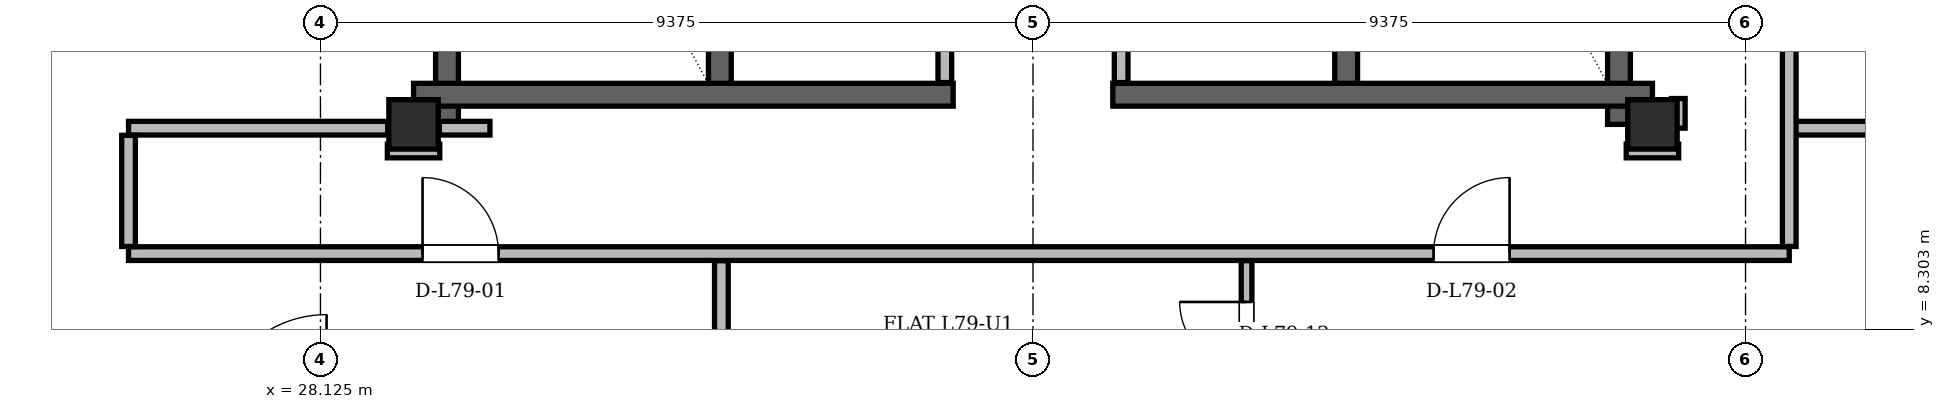
"""IFC4 building model, lengths in metres.
Left out: names, types, materials, properties, quantities, classifications, styles, units other than length and angle.
Written with IfcOpenShell. Run it as: python <this file> out.ifc"""

import sys

from ifc_helpers import new_model, si_unit, direction, frame, frame_2d, origin, origin_2d, place, context, subcontext, project, spatial, rectangle, hollow_rectangle, extrude, element, fill, save


model = new_model("IFC4")
c1 = context("Model", 3, precision=1e-05, world=origin(), true_north=direction((0.0, 1.0)))
c2 = subcontext(c1, "Body", "Model", "MODEL_VIEW")
j1 = project(units=[si_unit("LENGTHUNIT", "METRE"), si_unit("PLANEANGLEUNIT", "RADIAN")], contexts=[c1])
p1 = place(None, origin())
s1 = spatial("IfcSite", under=j1, at=p1, CompositionType="ELEMENT")
p2 = place(p1, origin())
s2 = spatial("IfcBuilding", under=s1, at=p2, CompositionType="ELEMENT")
p3 = place(p2, frame((0.0, 0.0, 301.2)))
s3 = spatial("IfcBuildingStorey", under=s2, at=p3, CompositionType="ELEMENT", Elevation=301.2)
for number, where, z_axis, x_axis in (
    (1, (29.35, 11.0, 0.0), (0.0, 0.0, 1.0), (1.0, 0.0, 0.0)),
    (2, (45.65, 11.0, 0.0), (0.0, 0.0, 1.0), (1.0, 0.0, 0.0)),
):
    element("IfcColumn", number, at=place(p3, frame(where, z_axis=z_axis, x_axis=x_axis)), inside=s3, PredefinedType="COLUMN", context=c2, shape_type="SweptSolid", body=[
        extrude(hollow_rectangle(XDim=0.65, YDim=0.65, WallThickness=0.05, at=origin_2d()), origin(), (0.0, 0.0, 1.0), 3.9),
    ])
for number, where, z_axis, x_axis in (
    (3, (29.79, 11.0, 0.0), (0.0, 0.0, 1.0), (0.0, 1.0, 0.0)),
    (4, (45.21, 11.0, 0.0), (0.0, 0.0, 1.0), (0.0, 1.0, 0.0)),
):
    element("IfcWall", number, at=place(p3, frame(where, z_axis=z_axis, x_axis=x_axis)), inside=s3, PredefinedType="SHEAR", context=c2, shape_type="SweptSolid", body=[
        extrude(rectangle(XDim=13.3, YDim=0.3, at=frame_2d((6.65, 0.0))), origin(), (0.0, 0.0, 1.0), 3.68),
    ])
for number, where, z_axis, x_axis in (
    (5, (29.35, 11.39, 0.0), (0.0, 0.0, 1.0), (1.0, 0.0, 0.0)),
    (6, (38.55, 11.39, 0.0), (0.0, 0.0, 1.0), (1.0, 0.0, 0.0)),
):
    element("IfcWall", number, at=place(p3, frame(where, z_axis=z_axis, x_axis=x_axis)), inside=s3, PredefinedType="SHEAR", context=c2, shape_type="SweptSolid", body=[
        extrude(rectangle(XDim=7.1, YDim=0.3, at=frame_2d((3.55, 0.0))), origin(), (0.0, 0.0, 1.0), 3.68),
    ])
for number, where, z_axis, x_axis in (
    (7, (33.38, 11.54, 0.0), (0.0, 0.0, 1.0), (0.0, 1.0, 0.0)),
    (8, (41.62, 11.54, 0.0), (0.0, 0.0, 1.0), (0.0, 1.0, 0.0)),
):
    element("IfcWall", number, at=place(p3, frame(where, z_axis=z_axis, x_axis=x_axis)), inside=s3, PredefinedType="SHEAR", context=c2, shape_type="SweptSolid", body=[
        extrude(rectangle(XDim=7.62, YDim=0.3, at=frame_2d((3.81, 0.0))), origin(), (0.0, 0.0, 1.0), 3.68),
    ])
p4 = place(p3, frame((58.261, 10.345, 0.0), z_axis=(0.0, 0.0, 1.0), x_axis=(-0.499999872078, 0.86602547764, 0.0)))
e9 = element("IfcWall", 9, at=p4, inside=s3, PredefinedType="SOLIDWALL", context=c2, shape_type="SweptSolid", body=[
    extrude(rectangle(XDim=37.658, YDim=0.29, at=frame_2d((18.829, 0.0))), origin(), (0.0, 0.0, 1.0), 3.058),
])
p5 = place(p4, frame((8.034, 0.0, 0.0)))
e10 = element("IfcOpeningElement", 10, at=p5, cuts=e9, PredefinedType="OPENING", context=c2, shape_type="SweptSolid", body=[
    extrude(rectangle(XDim=1.5, YDim=2.2, at=frame_2d((0.75, 1.1))), frame((0.0, 0.145, 0.0), z_axis=(0.0, -1.0, 0.0), x_axis=(1.0, 0.0, 0.0)), (0.0, 0.0, 1.0), 0.29),
])
p6 = place(p4, frame((32.618, 0.0, 0.0)))
e11 = element("IfcOpeningElement", 11, at=p6, cuts=e9, PredefinedType="OPENING", context=c2, shape_type="SweptSolid", body=[
    extrude(rectangle(XDim=1.3, YDim=2.2, at=frame_2d((0.65, 1.1))), frame((0.0, 0.145, 0.0), z_axis=(0.0, -1.0, 0.0), x_axis=(1.0, 0.0, 0.0)), (0.0, 0.0, 1.0), 0.29),
])
p7 = place(p4, frame((1.003, 0.0, 0.85)))
e12 = element("IfcOpeningElement", 12, at=p7, cuts=e9, PredefinedType="OPENING", context=c2, shape_type="SweptSolid", body=[
    extrude(rectangle(XDim=1.2, YDim=1.48, at=frame_2d((0.6, 0.74))), frame((0.0, 0.145, 0.0), z_axis=(0.0, -1.0, 0.0), x_axis=(1.0, 0.0, 0.0)), (0.0, 0.0, 1.0), 0.29),
])
p8 = place(p4, frame((13.352, 0.0, 0.85)))
e13 = element("IfcOpeningElement", 13, at=p8, cuts=e9, PredefinedType="OPENING", context=c2, shape_type="SweptSolid", body=[
    extrude(rectangle(XDim=1.6, YDim=1.7, at=frame_2d((0.8, 0.85))), frame((0.0, 0.145, 0.0), z_axis=(0.0, -1.0, 0.0), x_axis=(1.0, 0.0, 0.0)), (0.0, 0.0, 1.0), 0.29),
])
p9 = place(p4, frame((35.063, 0.0, 0.85)))
e14 = element("IfcOpeningElement", 14, at=p9, cuts=e9, PredefinedType="OPENING", context=c2, shape_type="SweptSolid", body=[
    extrude(rectangle(XDim=1.2, YDim=1.48, at=frame_2d((0.6, 0.74))), frame((0.0, 0.145, 0.0), z_axis=(0.0, -1.0, 0.0), x_axis=(1.0, 0.0, 0.0)), (0.0, 0.0, 1.0), 0.29),
])
p10 = place(p4, frame((18.559, 0.0, 0.85)))
e15 = element("IfcOpeningElement", 15, at=p10, cuts=e9, PredefinedType="OPENING", context=c2, shape_type="SweptSolid", body=[
    extrude(rectangle(XDim=3.0, YDim=2.098, at=frame_2d((1.5, 1.049))), frame((0.0, 0.145, 0.0), z_axis=(0.0, -1.0, 0.0), x_axis=(1.0, 0.0, 0.0)), (0.0, 0.0, 1.0), 0.29),
])
p11 = place(p4, frame((24.514, 0.0, 0.85)))
e16 = element("IfcOpeningElement", 16, at=p11, cuts=e9, PredefinedType="OPENING", context=c2, shape_type="SweptSolid", body=[
    extrude(rectangle(XDim=1.2, YDim=1.48, at=frame_2d((0.6, 0.74))), frame((0.0, 0.145, 0.0), z_axis=(0.0, -1.0, 0.0), x_axis=(1.0, 0.0, 0.0)), (0.0, 0.0, 1.0), 0.29),
])
p12 = place(p4, frame((29.78, 0.0, 0.85)))
e17 = element("IfcOpeningElement", 17, at=p12, cuts=e9, PredefinedType="OPENING", context=c2, shape_type="SweptSolid", body=[
    extrude(rectangle(XDim=1.2, YDim=1.48, at=frame_2d((0.6, 0.74))), frame((0.0, 0.145, 0.0), z_axis=(0.0, -1.0, 0.0), x_axis=(1.0, 0.0, 0.0)), (0.0, 0.0, 1.0), 0.29),
])
p13 = place(p3, frame((35.568, 42.958, 0.0), z_axis=(0.0, 0.0, 1.0), x_axis=(-0.499999872078, -0.86602547764, 0.0)))
e18 = element("IfcWall", 18, at=p13, inside=s3, PredefinedType="SOLIDWALL", context=c2, shape_type="SweptSolid", body=[
    extrude(rectangle(XDim=37.658, YDim=0.29, at=frame_2d((18.829, 0.0))), origin(), (0.0, 0.0, 1.0), 3.058),
])
p14 = place(p13, frame((8.034, 0.0, 0.0)))
e19 = element("IfcOpeningElement", 19, at=p14, cuts=e18, PredefinedType="OPENING", context=c2, shape_type="SweptSolid", body=[
    extrude(rectangle(XDim=1.5, YDim=2.2, at=frame_2d((0.75, 1.1))), frame((0.0, 0.145, 0.0), z_axis=(0.0, -1.0, 0.0), x_axis=(1.0, 0.0, 0.0)), (0.0, 0.0, 1.0), 0.29),
])
p15 = place(p13, frame((32.518, 0.0, 0.0)))
e20 = element("IfcOpeningElement", 20, at=p15, cuts=e18, PredefinedType="OPENING", context=c2, shape_type="SweptSolid", body=[
    extrude(rectangle(XDim=1.5, YDim=2.2, at=frame_2d((0.75, 1.1))), frame((0.0, 0.145, 0.0), z_axis=(0.0, -1.0, 0.0), x_axis=(1.0, 0.0, 0.0)), (0.0, 0.0, 1.0), 0.29),
])
p16 = place(p13, frame((27.303, 0.0, 0.85)))
e21 = element("IfcOpeningElement", 21, at=p16, cuts=e18, PredefinedType="OPENING", context=c2, shape_type="SweptSolid", body=[
    extrude(rectangle(XDim=2.2, YDim=1.85, at=frame_2d((1.1, 0.925))), frame((0.0, 0.145, 0.0), z_axis=(0.0, -1.0, 0.0), x_axis=(1.0, 0.0, 0.0)), (0.0, 0.0, 1.0), 0.29),
])
p17 = place(p13, frame((34.437, 0.0, 0.85)))
e22 = element("IfcOpeningElement", 22, at=p17, cuts=e18, PredefinedType="OPENING", context=c2, shape_type="SweptSolid", body=[
    extrude(rectangle(XDim=1.6, YDim=1.7, at=frame_2d((0.8, 0.85))), frame((0.0, 0.145, 0.0), z_axis=(0.0, -1.0, 0.0), x_axis=(1.0, 0.0, 0.0)), (0.0, 0.0, 1.0), 0.29),
])
p18 = place(p13, frame((21.655, 0.0, 0.85)))
e23 = element("IfcOpeningElement", 23, at=p18, cuts=e18, PredefinedType="OPENING", context=c2, shape_type="SweptSolid", body=[
    extrude(rectangle(XDim=1.2, YDim=1.48, at=frame_2d((0.6, 0.74))), frame((0.0, 0.145, 0.0), z_axis=(0.0, -1.0, 0.0), x_axis=(1.0, 0.0, 0.0)), (0.0, 0.0, 1.0), 0.29),
])
p19 = place(p13, frame((23.901, 0.0, 0.85)))
e24 = element("IfcOpeningElement", 24, at=p19, cuts=e18, PredefinedType="OPENING", context=c2, shape_type="SweptSolid", body=[
    extrude(rectangle(XDim=1.4, YDim=1.6, at=frame_2d((0.7, 0.8))), frame((0.0, 0.145, 0.0), z_axis=(0.0, -1.0, 0.0), x_axis=(1.0, 0.0, 0.0)), (0.0, 0.0, 1.0), 0.29),
])
p20 = place(p13, frame((15.246, 0.0, 0.85)))
e25 = element("IfcOpeningElement", 25, at=p20, cuts=e18, PredefinedType="OPENING", context=c2, shape_type="SweptSolid", body=[
    extrude(rectangle(XDim=2.6, YDim=1.95, at=frame_2d((1.3, 0.975))), frame((0.0, 0.145, 0.0), z_axis=(0.0, -1.0, 0.0), x_axis=(1.0, 0.0, 0.0)), (0.0, 0.0, 1.0), 0.29),
])
p21 = place(p13, frame((1.164, 0.0, 0.85)))
e26 = element("IfcOpeningElement", 26, at=p21, cuts=e18, PredefinedType="OPENING", context=c2, shape_type="SweptSolid", body=[
    extrude(rectangle(XDim=1.2, YDim=1.48, at=frame_2d((0.6, 0.74))), frame((0.0, 0.145, 0.0), z_axis=(0.0, -1.0, 0.0), x_axis=(1.0, 0.0, 0.0)), (0.0, 0.0, 1.0), 0.29),
])
p22 = place(p3, frame((36.34, 11.55, 0.0), z_axis=(0.0, 0.0, 1.0), x_axis=(0.0, 1.0, 0.0)))
e27 = element("IfcWall", 27, at=p22, inside=s3, PredefinedType="PARTITIONING", context=c2, shape_type="SweptSolid", body=[
    extrude(rectangle(XDim=5.55, YDim=0.18, at=frame_2d((2.775, 0.0))), origin(), (0.0, 0.0, 1.0), 3.68),
])
p23 = place(p22, frame((0.55, 0.0, 0.0)))
e28 = element("IfcOpeningElement", 28, at=p23, cuts=e27, PredefinedType="OPENING", context=c2, shape_type="SweptSolid", body=[
    extrude(rectangle(XDim=0.88, YDim=2.08, at=frame_2d((0.44, 1.04))), frame((0.0, 0.09, 0.0), z_axis=(0.0, -1.0, 0.0), x_axis=(1.0, 0.0, 0.0)), (0.0, 0.0, 1.0), 0.18),
])
p24 = place(p22, frame((3.25, 0.0, 0.0)))
e29 = element("IfcOpeningElement", 29, at=p24, cuts=e27, PredefinedType="OPENING", context=c2, shape_type="SweptSolid", body=[
    extrude(rectangle(XDim=0.88, YDim=2.08, at=frame_2d((0.44, 1.04))), frame((0.0, 0.09, 0.0), z_axis=(0.0, -1.0, 0.0), x_axis=(1.0, 0.0, 0.0)), (0.0, 0.0, 1.0), 0.18),
])
p25 = place(p3, frame((38.66, 11.55, 0.0), z_axis=(0.0, 0.0, 1.0), x_axis=(0.0, 1.0, 0.0)))
e30 = element("IfcWall", 30, at=p25, inside=s3, PredefinedType="PARTITIONING", context=c2, shape_type="SweptSolid", body=[
    extrude(rectangle(XDim=5.55, YDim=0.18, at=frame_2d((2.775, 0.0))), origin(), (0.0, 0.0, 1.0), 3.68),
])
p26 = place(p25, frame((1.35, 0.0, 0.0)))
e31 = element("IfcOpeningElement", 31, at=p26, cuts=e30, PredefinedType="OPENING", context=c2, shape_type="SweptSolid", body=[
    extrude(rectangle(XDim=0.88, YDim=2.08, at=frame_2d((0.44, 1.04))), frame((0.0, 0.09, 0.0), z_axis=(0.0, -1.0, 0.0), x_axis=(1.0, 0.0, 0.0)), (0.0, 0.0, 1.0), 0.18),
])
p27 = place(p25, frame((4.1, 0.0, 0.0)))
e32 = element("IfcOpeningElement", 32, at=p27, cuts=e30, PredefinedType="OPENING", context=c2, shape_type="SweptSolid", body=[
    extrude(rectangle(XDim=0.88, YDim=2.08, at=frame_2d((0.44, 1.04))), frame((0.0, 0.09, 0.0), z_axis=(0.0, -1.0, 0.0), x_axis=(1.0, 0.0, 0.0)), (0.0, 0.0, 1.0), 0.18),
])
p28 = place(p3, frame((25.6, 9.3, 0.0), z_axis=(0.0, 0.0, 1.0), x_axis=(1.0, 0.0, 0.0)))
e33 = element("IfcWall", 33, at=p28, inside=s3, PredefinedType="PARTITIONING", context=c2, shape_type="SweptSolid", body=[
    extrude(rectangle(XDim=21.85, YDim=0.18, at=frame_2d((10.925, 0.0))), origin(), (0.0, 0.0, 1.0), 3.68),
])
p29 = place(p28, frame((3.868, 0.0, 0.0)))
e34 = element("IfcOpeningElement", 34, at=p29, cuts=e33, PredefinedType="OPENING", context=c2, shape_type="SweptSolid", body=[
    extrude(rectangle(XDim=1.0, YDim=2.18, at=frame_2d((0.5, 1.09))), frame((0.0, 0.09, 0.0), z_axis=(0.0, -1.0, 0.0), x_axis=(1.0, 0.0, 0.0)), (0.0, 0.0, 1.0), 0.18),
])
p30 = place(p28, frame((17.17, 0.0, 0.0)))
e35 = element("IfcOpeningElement", 35, at=p30, cuts=e33, PredefinedType="OPENING", context=c2, shape_type="SweptSolid", body=[
    extrude(rectangle(XDim=1.0, YDim=2.18, at=frame_2d((0.5, 1.09))), frame((0.0, 0.09, 0.0), z_axis=(0.0, -1.0, 0.0), x_axis=(1.0, 0.0, 0.0)), (0.0, 0.0, 1.0), 0.18),
])
for number, where, z_axis, x_axis in (
    (36, (29.005, 10.65, 0.0), (0.0, 0.0, 1.0), (1.0, 0.0, 0.0)),
    (37, (45.305, 10.65, 0.0), (0.0, 0.0, 1.0), (1.0, 0.0, 0.0)),
):
    element("IfcWall", number, at=place(p3, frame(where, z_axis=z_axis, x_axis=x_axis)), inside=s3, PredefinedType="PARTITIONING", context=c2, shape_type="SweptSolid", body=[
        extrude(rectangle(XDim=0.69, YDim=0.18, at=frame_2d((0.345, 0.0))), origin(), (0.0, 0.0, 1.0), 3.68),
    ])
p31 = place(p3, frame((25.6, 10.95, 0.0), z_axis=(0.0, 0.0, 1.0), x_axis=(1.0, 0.0, 0.0)))
e38 = element("IfcWall", 38, at=p31, inside=s3, PredefinedType="PARTITIONING", context=c2, shape_type="SweptSolid", body=[
    extrude(rectangle(XDim=3.41, YDim=0.18, at=frame_2d((1.705, 0.0))), origin(), (0.0, 0.0, 1.0), 3.266),
])
p32 = place(p3, frame((29.69, 10.95, 0.0), z_axis=(0.0, 0.0, 1.0), x_axis=(1.0, 0.0, 0.0)))
e39 = element("IfcWall", 39, at=p32, inside=s3, PredefinedType="PARTITIONING", context=c2, shape_type="SweptSolid", body=[
    extrude(rectangle(XDim=0.665, YDim=0.18, at=frame_2d((0.333, 0.0))), origin(), (0.0, 0.0, 1.0), 2.82),
])
p33 = place(p3, frame((47.45, 10.95, 0.0), z_axis=(0.0, 0.0, 1.0), x_axis=(1.0, 0.0, 0.0)))
e40 = element("IfcWall", 40, at=p33, inside=s3, PredefinedType="PARTITIONING", context=c2, shape_type="SweptSolid", body=[
    extrude(rectangle(XDim=10.29, YDim=0.18, at=frame_2d((5.145, 0.0))), origin(), (0.0, 0.0, 1.0), 3.266),
])
p34 = place(p3, frame((25.6, 9.394, 0.0), z_axis=(0.0, 0.0, 1.0), x_axis=(0.0, 1.0, 0.0)))
e41 = element("IfcWall", 41, at=p34, inside=s3, PredefinedType="PARTITIONING", context=c2, shape_type="SweptSolid", body=[
    extrude(rectangle(XDim=1.462, YDim=0.18, at=frame_2d((0.731, 0.0))), origin(), (0.0, 0.0, 1.0), 3.266),
])
p35 = place(p3, frame((33.4, 7.147, 0.0), z_axis=(0.0, 0.0, 1.0), x_axis=(0.0, 1.0, 0.0)))
e42 = element("IfcWall", 42, at=p35, inside=s3, PredefinedType="PARTITIONING", context=c2, shape_type="SweptSolid", body=[
    extrude(rectangle(XDim=2.059, YDim=0.18, at=frame_2d((1.03, 0.0))), origin(), (0.0, 0.0, 1.0), 3.68),
])
p36 = place(p3, frame((40.31, 7.147, 0.0), z_axis=(0.0, 0.0, 1.0), x_axis=(0.0, 1.0, 0.0)))
e43 = element("IfcWall", 43, at=p36, inside=s3, PredefinedType="PARTITIONING", context=c2, shape_type="SweptSolid", body=[
    extrude(rectangle(XDim=2.059, YDim=0.14, at=frame_2d((1.03, 0.0))), origin(), (0.0, 0.0, 1.0), 3.68),
])
p37 = place(p36, frame((0.637, 0.0, 0.0)))
e44 = element("IfcOpeningElement", 44, at=p37, cuts=e43, PredefinedType="OPENING", context=c2, shape_type="SweptSolid", body=[
    extrude(rectangle(XDim=0.88, YDim=2.08, at=frame_2d((0.44, 1.04))), frame((0.0, 0.07, 0.0), z_axis=(0.0, -1.0, 0.0), x_axis=(1.0, 0.0, 0.0)), (0.0, 0.0, 1.0), 0.14),
])
p38 = place(p3, frame((45.99, 10.95, 0.0), z_axis=(0.0, 0.0, 1.0), x_axis=(0.0, 1.0, 0.0)))
e45 = element("IfcWall", 45, at=p38, inside=s3, PredefinedType="PARTITIONING", context=c2, shape_type="SweptSolid", body=[
    extrude(rectangle(XDim=0.39, YDim=0.18, at=frame_2d((0.195, 0.0))), origin(), (0.0, 0.0, 1.0), 3.68),
])
p39 = place(p3, frame((47.45, 9.394, 0.0), z_axis=(0.0, 0.0, 1.0), x_axis=(0.0, 1.0, 0.0)))
e46 = element("IfcWall", 46, at=p39, inside=s3, PredefinedType="PARTITIONING", context=c2, shape_type="SweptSolid", body=[
    extrude(rectangle(XDim=16.482, YDim=0.18, at=frame_2d((8.241, 0.0))), origin(), (0.0, 0.0, 1.0), 3.266),
])
p40 = place(p39, frame((9.343, 0.0, 0.0)))
e47 = element("IfcOpeningElement", 47, at=p40, cuts=e46, PredefinedType="OPENING", context=c2, shape_type="SweptSolid", body=[
    extrude(rectangle(XDim=1.0, YDim=2.18, at=frame_2d((0.5, 1.09))), frame((0.0, 0.09, 0.0), z_axis=(0.0, -1.0, 0.0), x_axis=(1.0, 0.0, 0.0)), (0.0, 0.0, 1.0), 0.18),
])
p41 = place(p29, origin())
e48 = element("IfcDoor", 48, at=p41, inside=s3, OperationType="SINGLE_SWING_LEFT", PredefinedType="DOOR", context=c2, shape_type="SweptSolid", body=[
    extrude(rectangle(XDim=1.0, YDim=2.18, at=frame_2d((0.5, 1.09))), frame((0.0, 0.025, 0.0), z_axis=(0.0, -1.0, 0.0), x_axis=(1.0, 0.0, 0.0)), (0.0, 0.0, 1.0), 0.05),
])
fill(e34, e48)
p42 = place(p30, origin())
e49 = element("IfcDoor", 49, at=p42, inside=s3, OperationType="SINGLE_SWING_RIGHT", PredefinedType="DOOR", context=c2, shape_type="SweptSolid", body=[
    extrude(rectangle(XDim=1.0, YDim=2.18, at=frame_2d((0.5, 1.09))), frame((0.0, 0.025, 0.0), z_axis=(0.0, -1.0, 0.0), x_axis=(1.0, 0.0, 0.0)), (0.0, 0.0, 1.0), 0.05),
])
fill(e35, e49)
p43 = place(p37, origin())
e50 = element("IfcDoor", 50, at=p43, inside=s3, OperationType="SINGLE_SWING_RIGHT", PredefinedType="DOOR", context=c2, shape_type="SweptSolid", body=[
    extrude(rectangle(XDim=0.88, YDim=2.08, at=frame_2d((0.44, 1.04))), frame((0.0, 0.025, 0.0), z_axis=(0.0, -1.0, 0.0), x_axis=(1.0, 0.0, 0.0)), (0.0, 0.0, 1.0), 0.05),
])
fill(e44, e50)
save(model, sys.argv[1])
